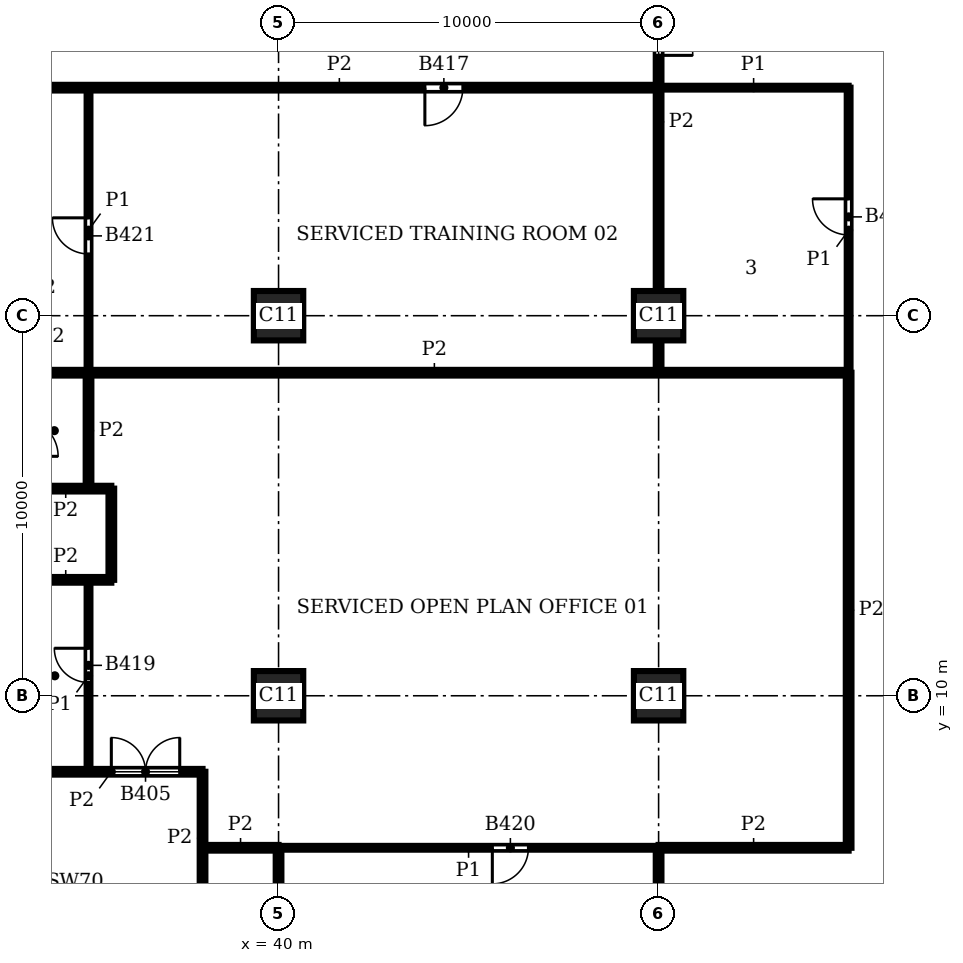
"""IFC4 building model, lengths in metres.
Left out: names, types, materials, properties, quantities, classifications, styles, units other than length and angle.
Written with IfcOpenShell. Run it as: python <this file> out.ifc"""

import sys

from ifc_helpers import new_model, si_unit, direction, frame, frame_2d, origin, origin_2d, place, context, subcontext, project, spatial, rectangle, extrude, element, fill, save


model = new_model("IFC4")
c1 = context("Model", 3, precision=1e-05, world=origin(), true_north=direction((0.0, 1.0)))
c2 = subcontext(c1, "Body", "Model", "MODEL_VIEW")
j1 = project(units=[si_unit("LENGTHUNIT", "METRE"), si_unit("PLANEANGLEUNIT", "RADIAN")], contexts=[c1])
p1 = place(None, origin())
s1 = spatial("IfcSite", under=j1, at=p1, CompositionType="ELEMENT")
p2 = place(p1, origin())
s2 = spatial("IfcBuilding", under=s1, at=p2, CompositionType="ELEMENT")
p3 = place(p2, frame((0.0, 0.0, 166.8)))
s3 = spatial("IfcBuildingStorey", under=s2, at=p3, CompositionType="ELEMENT", Elevation=166.8)
for number, where, z_axis, x_axis in (
    (1, (40.0, 10.0, 0.0), (0.0, 0.0, 1.0), (1.0, 0.0, 0.0)),
    (2, (40.0, 20.0, 0.0), (0.0, 0.0, 1.0), (1.0, 0.0, 0.0)),
    (3, (50.0, 10.0, 0.0), (0.0, 0.0, 1.0), (1.0, 0.0, 0.0)),
    (4, (50.0, 20.0, 0.0), (0.0, 0.0, 1.0), (1.0, 0.0, 0.0)),
):
    element("IfcColumn", number, at=place(p3, frame(where, z_axis=z_axis, x_axis=x_axis)), inside=s3, PredefinedType="COLUMN", context=c2, shape_type="SweptSolid", body=[
        extrude(rectangle(XDim=1.3, YDim=1.3, at=origin_2d()), origin(), (0.0, 0.0, 1.0), 3.9),
    ])
p4 = place(p3, frame((35.0, 8.0, 0.0), z_axis=(0.0, 0.0, 1.0), x_axis=(0.0, 1.0, 0.0)))
e5 = element("IfcWall", 5, at=p4, inside=s3, PredefinedType="PARTITIONING", context=c2, shape_type="SweptSolid", body=[
    extrude(rectangle(XDim=5.05, YDim=0.1, at=frame_2d((2.525, 0.0))), origin(), (0.0, 0.0, 1.0), 3.58),
])
p5 = place(p4, frame((2.35, 0.0, 0.0)))
e6 = element("IfcOpeningElement", 6, at=p5, cuts=e5, PredefinedType="OPENING", context=c2, shape_type="SweptSolid", body=[
    extrude(rectangle(XDim=0.9, YDim=2.1, at=frame_2d((0.45, 1.05))), frame((0.0, 0.06, 0.0), z_axis=(0.0, -1.0, 0.0), x_axis=(1.0, 0.0, 0.0)), (0.0, 0.0, 1.0), 0.12),
])
p6 = place(p3, frame((35.0, 18.5, 0.0), z_axis=(0.0, 0.0, 1.0), x_axis=(0.0, 1.0, 0.0)))
e7 = element("IfcWall", 7, at=p6, inside=s3, PredefinedType="PARTITIONING", context=c2, shape_type="SweptSolid", body=[
    extrude(rectangle(XDim=7.5, YDim=0.1, at=frame_2d((3.75, 0.0))), origin(), (0.0, 0.0, 1.0), 3.58),
])
p7 = place(p6, frame((3.125, 0.0, 0.0)))
e8 = element("IfcOpeningElement", 8, at=p7, cuts=e7, PredefinedType="OPENING", context=c2, shape_type="SweptSolid", body=[
    extrude(rectangle(XDim=0.95, YDim=2.1, at=frame_2d((0.475, 1.05))), frame((0.0, 0.06, 0.0), z_axis=(0.0, -1.0, 0.0), x_axis=(1.0, 0.0, 0.0)), (0.0, 0.0, 1.0), 0.12),
])
p8 = place(p3, frame((55.0, 18.5, 0.0), z_axis=(0.0, 0.0, 1.0), x_axis=(0.0, 1.0, 0.0)))
e9 = element("IfcWall", 9, at=p8, inside=s3, PredefinedType="PARTITIONING", context=c2, shape_type="SweptSolid", body=[
    extrude(rectangle(XDim=7.5, YDim=0.1, at=frame_2d((3.75, 0.0))), origin(), (0.0, 0.0, 1.0), 3.58),
])
p9 = place(p8, frame((3.625, 0.0, 0.0)))
e10 = element("IfcOpeningElement", 10, at=p9, cuts=e9, PredefinedType="OPENING", context=c2, shape_type="SweptSolid", body=[
    extrude(rectangle(XDim=0.95, YDim=2.1, at=frame_2d((0.475, 1.05))), frame((0.0, 0.06, 0.0), z_axis=(0.0, -1.0, 0.0), x_axis=(1.0, 0.0, 0.0)), (0.0, 0.0, 1.0), 0.12),
])
p10 = place(p3, frame((40.0, 6.0, 0.0), z_axis=(0.0, 0.0, 1.0), x_axis=(1.0, 0.0, 0.0)))
e11 = element("IfcWall", 11, at=p10, inside=s3, PredefinedType="PARTITIONING", context=c2, shape_type="SweptSolid", body=[
    extrude(rectangle(XDim=10.0, YDim=0.1, at=frame_2d((5.0, 0.0))), origin(), (0.0, 0.0, 1.0), 3.58),
])
p11 = place(p10, frame((5.625, 0.0, 0.0)))
e12 = element("IfcOpeningElement", 12, at=p11, cuts=e11, PredefinedType="OPENING", context=c2, shape_type="SweptSolid", body=[
    extrude(rectangle(XDim=0.95, YDim=2.1, at=frame_2d((0.475, 1.05))), frame((0.0, 0.06, 0.0), z_axis=(0.0, -1.0, 0.0), x_axis=(1.0, 0.0, 0.0)), (0.0, 0.0, 1.0), 0.12),
])
p12 = place(p3, frame((50.0, 26.0, 0.0), z_axis=(0.0, 0.0, 1.0), x_axis=(1.0, 0.0, 0.0)))
e13 = element("IfcWall", 13, at=p12, inside=s3, PredefinedType="PARTITIONING", context=c2, shape_type="SweptSolid", body=[
    extrude(rectangle(XDim=5.0, YDim=0.1, at=frame_2d((2.5, 0.0))), origin(), (0.0, 0.0, 1.0), 3.58),
])
p13 = place(p3, frame((35.0, 15.45, 0.0), z_axis=(0.0, 0.0, 1.0), x_axis=(0.0, 1.0, 0.0)))
e14 = element("IfcWall", 14, at=p13, inside=s3, PredefinedType="PARTITIONING", context=c2, shape_type="SweptSolid", body=[
    extrude(rectangle(XDim=3.05, YDim=0.15, at=frame_2d((1.525, 0.0))), origin(), (0.0, 0.0, 1.0), 3.58),
])
p14 = place(p3, frame((35.6, 13.05, 0.0), z_axis=(0.0, 0.0, 1.0), x_axis=(0.0, 1.0, 0.0)))
e15 = element("IfcWall", 15, at=p14, inside=s3, PredefinedType="PARTITIONING", context=c2, shape_type="SweptSolid", body=[
    extrude(rectangle(XDim=2.4, YDim=0.15, at=frame_2d((1.2, 0.0))), origin(), (0.0, 0.0, 1.0), 3.58),
])
p15 = place(p3, frame((38.0, 4.5, 0.0), z_axis=(0.0, 0.0, 1.0), x_axis=(0.0, 1.0, 0.0)))
e16 = element("IfcWall", 16, at=p15, inside=s3, PredefinedType="PARTITIONING", context=c2, shape_type="SweptSolid", body=[
    extrude(rectangle(XDim=3.5, YDim=0.15, at=frame_2d((1.75, 0.0))), origin(), (0.0, 0.0, 1.0), 3.58),
])
for number, where, z_axis, x_axis in (
    (17, (40.0, 0.45, 0.0), (0.0, 0.0, 1.0), (0.0, 1.0, 0.0)),
    (18, (50.0, 0.45, 0.0), (0.0, 0.0, 1.0), (0.0, 1.0, 0.0)),
):
    element("IfcWall", number, at=place(p3, frame(where, z_axis=z_axis, x_axis=x_axis)), inside=s3, PredefinedType="PARTITIONING", context=c2, shape_type="SweptSolid", body=[
        extrude(rectangle(XDim=5.55, YDim=0.15, at=frame_2d((2.775, 0.0))), origin(), (0.0, 0.0, 1.0), 3.58),
    ])
p16 = place(p3, frame((50.0, 18.5, 0.0), z_axis=(0.0, 0.0, 1.0), x_axis=(0.0, 1.0, 0.0)))
e19 = element("IfcWall", 19, at=p16, inside=s3, PredefinedType="PARTITIONING", context=c2, shape_type="SweptSolid", body=[
    extrude(rectangle(XDim=0.85, YDim=0.15, at=frame_2d((0.425, 0.0))), origin(), (0.0, 0.0, 1.0), 3.58),
])
p17 = place(p3, frame((50.0, 20.65, 0.0), z_axis=(0.0, 0.0, 1.0), x_axis=(0.0, 1.0, 0.0)))
e20 = element("IfcWall", 20, at=p17, inside=s3, PredefinedType="PARTITIONING", context=c2, shape_type="SweptSolid", body=[
    extrude(rectangle(XDim=8.9, YDim=0.15, at=frame_2d((4.45, 0.0))), origin(), (0.0, 0.0, 1.0), 3.58),
])
p18 = place(p17, frame((6.2, 0.0, 0.0)))
e21 = element("IfcOpeningElement", 21, at=p18, cuts=e20, PredefinedType="OPENING", context=c2, shape_type="SweptSolid", body=[
    extrude(rectangle(XDim=1.8, YDim=2.1, at=frame_2d((0.9, 1.05))), frame((0.0, 0.085, 0.0), z_axis=(0.0, -1.0, 0.0), x_axis=(1.0, 0.0, 0.0)), (0.0, 0.0, 1.0), 0.17),
])
p19 = place(p3, frame((55.0, 6.0, 0.0), z_axis=(0.0, 0.0, 1.0), x_axis=(0.0, 1.0, 0.0)))
e22 = element("IfcWall", 22, at=p19, inside=s3, PredefinedType="PARTITIONING", context=c2, shape_type="SweptSolid", body=[
    extrude(rectangle(XDim=12.5, YDim=0.15, at=frame_2d((6.25, 0.0))), origin(), (0.0, 0.0, 1.0), 3.58),
])
p20 = place(p3, frame((38.0, 6.0, 0.0), z_axis=(0.0, 0.0, 1.0), x_axis=(1.0, 0.0, 0.0)))
e23 = element("IfcWall", 23, at=p20, inside=s3, PredefinedType="PARTITIONING", context=c2, shape_type="SweptSolid", body=[
    extrude(rectangle(XDim=2.0, YDim=0.15, at=frame_2d((1.0, 0.0))), origin(), (0.0, 0.0, 1.0), 3.58),
])
p21 = place(p3, frame((50.0, 6.0, 0.0), z_axis=(0.0, 0.0, 1.0), x_axis=(1.0, 0.0, 0.0)))
e24 = element("IfcWall", 24, at=p21, inside=s3, PredefinedType="PARTITIONING", context=c2, shape_type="SweptSolid", body=[
    extrude(rectangle(XDim=5.0, YDim=0.15, at=frame_2d((2.5, 0.0))), origin(), (0.0, 0.0, 1.0), 3.58),
])
p22 = place(p3, frame((33.2, 8.0, 0.0), z_axis=(0.0, 0.0, 1.0), x_axis=(1.0, 0.0, 0.0)))
e25 = element("IfcWall", 25, at=p22, inside=s3, PredefinedType="PARTITIONING", context=c2, shape_type="SweptSolid", body=[
    extrude(rectangle(XDim=4.8, YDim=0.15, at=frame_2d((2.4, 0.0))), origin(), (0.0, 0.0, 1.0), 3.58),
])
p23 = place(p22, frame((2.4, 0.0, 0.0)))
e26 = element("IfcOpeningElement", 26, at=p23, cuts=e25, PredefinedType="OPENING", context=c2, shape_type="SweptSolid", body=[
    extrude(rectangle(XDim=1.8, YDim=2.1, at=frame_2d((0.9, 1.05))), frame((0.0, 0.085, 0.0), z_axis=(0.0, -1.0, 0.0), x_axis=(1.0, 0.0, 0.0)), (0.0, 0.0, 1.0), 0.17),
])
for number, where, z_axis, x_axis in (
    (27, (33.2, 13.05, 0.0), (0.0, 0.0, 1.0), (1.0, 0.0, 0.0)),
    (28, (33.2, 15.45, 0.0), (0.0, 0.0, 1.0), (1.0, 0.0, 0.0)),
):
    element("IfcWall", number, at=place(p3, frame(where, z_axis=z_axis, x_axis=x_axis)), inside=s3, PredefinedType="PARTITIONING", context=c2, shape_type="SweptSolid", body=[
        extrude(rectangle(XDim=2.4, YDim=0.15, at=frame_2d((1.2, 0.0))), origin(), (0.0, 0.0, 1.0), 3.58),
    ])
p24 = place(p3, frame((33.2, 18.5, 0.0), z_axis=(0.0, 0.0, 1.0), x_axis=(1.0, 0.0, 0.0)))
e29 = element("IfcWall", 29, at=p24, inside=s3, PredefinedType="PARTITIONING", context=c2, shape_type="SweptSolid", body=[
    extrude(rectangle(XDim=21.8, YDim=0.15, at=frame_2d((10.9, 0.0))), origin(), (0.0, 0.0, 1.0), 3.58),
])
p25 = place(p3, frame((33.2, 26.0, 0.0), z_axis=(0.0, 0.0, 1.0), x_axis=(1.0, 0.0, 0.0)))
e30 = element("IfcWall", 30, at=p25, inside=s3, PredefinedType="PARTITIONING", context=c2, shape_type="SweptSolid", body=[
    extrude(rectangle(XDim=16.8, YDim=0.15, at=frame_2d((8.4, 0.0))), origin(), (0.0, 0.0, 1.0), 3.58),
])
p26 = place(p25, frame((10.65, 0.0, 0.0)))
e31 = element("IfcOpeningElement", 31, at=p26, cuts=e30, PredefinedType="OPENING", context=c2, shape_type="SweptSolid", body=[
    extrude(rectangle(XDim=1.0, YDim=2.1, at=frame_2d((0.5, 1.05))), frame((0.0, 0.085, 0.0), z_axis=(0.0, -1.0, 0.0), x_axis=(1.0, 0.0, 0.0)), (0.0, 0.0, 1.0), 0.17),
])
p27 = place(p23, origin())
e32 = element("IfcDoor", 32, at=p27, inside=s3, OperationType="DOUBLE_DOOR_SINGLE_SWING", PredefinedType="DOOR", context=c2, shape_type="SweptSolid", body=[
    extrude(rectangle(XDim=1.8, YDim=2.1, at=frame_2d((0.9, 1.05))), frame((0.0, 0.025, 0.0), z_axis=(0.0, -1.0, 0.0), x_axis=(1.0, 0.0, 0.0)), (0.0, 0.0, 1.0), 0.05),
])
fill(e26, e32)
p28 = place(p18, frame((1.8, 0.0, 0.0), z_axis=(0.0, 0.0, 1.0), x_axis=(-1.0, 0.0, 0.0)))
e33 = element("IfcDoor", 33, at=p28, inside=s3, OperationType="DOUBLE_DOOR_SINGLE_SWING", PredefinedType="DOOR", context=c2, shape_type="SweptSolid", body=[
    extrude(rectangle(XDim=1.8, YDim=2.1, at=frame_2d((0.9, 1.05))), frame((0.0, 0.025, 0.0), z_axis=(0.0, -1.0, 0.0), x_axis=(1.0, 0.0, 0.0)), (0.0, 0.0, 1.0), 0.05),
])
fill(e21, e33)
p29 = place(p26, frame((1.0, 0.0, 0.0), z_axis=(0.0, 0.0, 1.0), x_axis=(-1.0, 0.0, 0.0)))
e34 = element("IfcDoor", 34, at=p29, inside=s3, OperationType="SINGLE_SWING_RIGHT", PredefinedType="DOOR", context=c2, shape_type="SweptSolid", body=[
    extrude(rectangle(XDim=1.0, YDim=2.1, at=frame_2d((0.5, 1.05))), frame((0.0, 0.025, 0.0), z_axis=(0.0, -1.0, 0.0), x_axis=(1.0, 0.0, 0.0)), (0.0, 0.0, 1.0), 0.05),
])
fill(e31, e34)
p30 = place(p5, origin())
e35 = element("IfcDoor", 35, at=p30, inside=s3, OperationType="SINGLE_SWING_RIGHT", PredefinedType="DOOR", context=c2, shape_type="SweptSolid", body=[
    extrude(rectangle(XDim=0.9, YDim=2.1, at=frame_2d((0.45, 1.05))), frame((0.0, 0.025, 0.0), z_axis=(0.0, -1.0, 0.0), x_axis=(1.0, 0.0, 0.0)), (0.0, 0.0, 1.0), 0.05),
])
fill(e6, e35)
p31 = place(p11, frame((0.95, 0.0, 0.0), z_axis=(0.0, 0.0, 1.0), x_axis=(-1.0, 0.0, 0.0)))
e36 = element("IfcDoor", 36, at=p31, inside=s3, OperationType="SINGLE_SWING_RIGHT", PredefinedType="DOOR", context=c2, shape_type="SweptSolid", body=[
    extrude(rectangle(XDim=0.95, YDim=2.1, at=frame_2d((0.475, 1.05))), frame((0.0, 0.025, 0.0), z_axis=(0.0, -1.0, 0.0), x_axis=(1.0, 0.0, 0.0)), (0.0, 0.0, 1.0), 0.05),
])
fill(e12, e36)
p32 = place(p7, origin())
e37 = element("IfcDoor", 37, at=p32, inside=s3, OperationType="SINGLE_SWING_RIGHT", PredefinedType="DOOR", context=c2, shape_type="SweptSolid", body=[
    extrude(rectangle(XDim=0.95, YDim=2.1, at=frame_2d((0.475, 1.05))), frame((0.0, 0.025, 0.0), z_axis=(0.0, -1.0, 0.0), x_axis=(1.0, 0.0, 0.0)), (0.0, 0.0, 1.0), 0.05),
])
fill(e8, e37)
p33 = place(p9, origin())
e38 = element("IfcDoor", 38, at=p33, inside=s3, OperationType="SINGLE_SWING_RIGHT", PredefinedType="DOOR", context=c2, shape_type="SweptSolid", body=[
    extrude(rectangle(XDim=0.95, YDim=2.1, at=frame_2d((0.475, 1.05))), frame((0.0, 0.025, 0.0), z_axis=(0.0, -1.0, 0.0), x_axis=(1.0, 0.0, 0.0)), (0.0, 0.0, 1.0), 0.05),
])
fill(e10, e38)
save(model, sys.argv[1])
